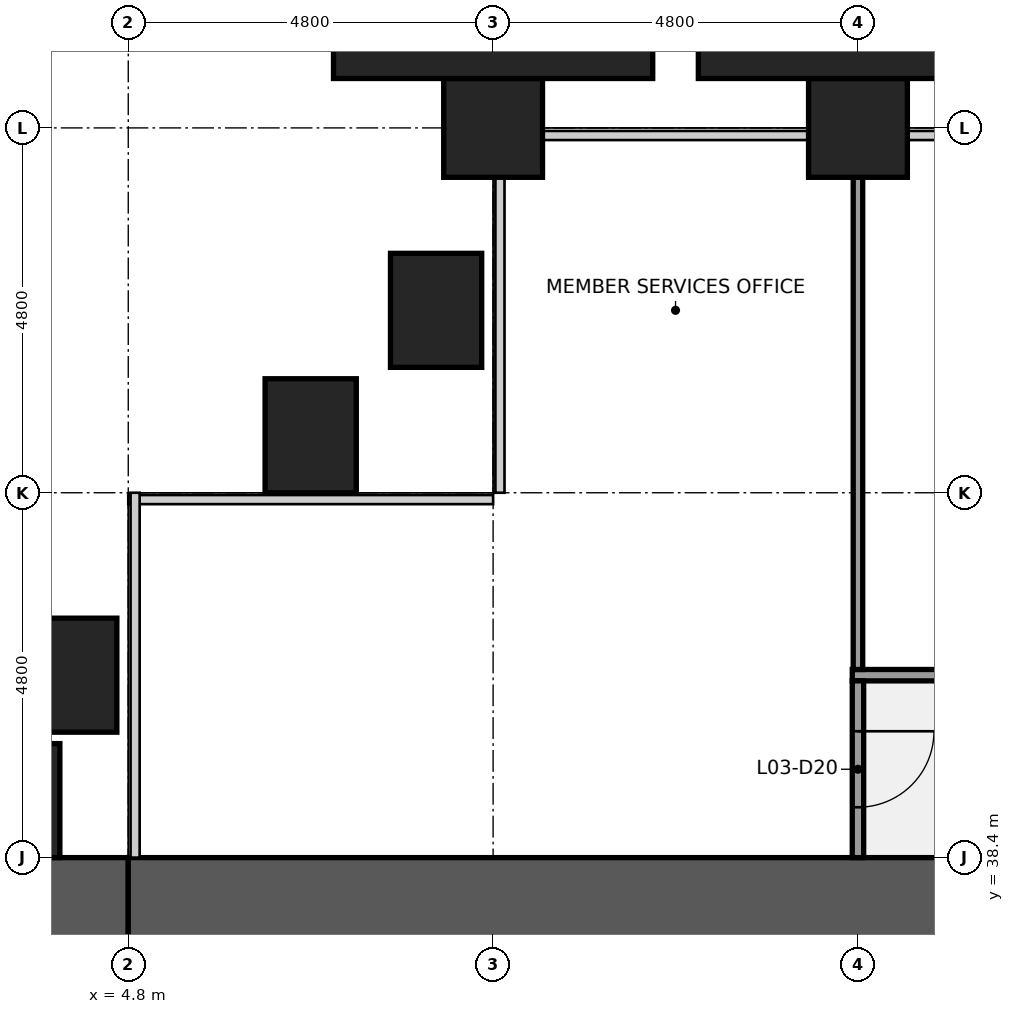
"""IFC4 building model, lengths in metres.
Left out: names, types, materials, properties, quantities, classifications, styles, units other than length and angle.
Written with IfcOpenShell. Run it as: python <this file> out.ifc"""

import sys

from ifc_helpers import new_model, si_unit, direction, frame, frame_2d, origin, origin_2d, place, context, subcontext, project, spatial, rectangle, extrude, element, fill, save


model = new_model("IFC4")
c1 = context("Model", 3, precision=1e-05, world=origin(), true_north=direction((0.0, 1.0)))
c2 = subcontext(c1, "Body", "Model", "MODEL_VIEW")
j1 = project(units=[si_unit("LENGTHUNIT", "METRE"), si_unit("PLANEANGLEUNIT", "RADIAN")], contexts=[c1])
p1 = place(None, origin())
s1 = spatial("IfcSite", under=j1, at=p1, CompositionType="ELEMENT")
p2 = place(p1, origin())
s2 = spatial("IfcBuilding", under=s1, at=p2, CompositionType="ELEMENT")
p3 = place(p2, frame((0.0, 0.0, 21.4)))
s3 = spatial("IfcBuildingStorey", under=s2, at=p3, CompositionType="ELEMENT", Elevation=21.4)
for number, where, z_axis, x_axis in (
    (1, (9.6, 48.0, 0.0), (0.0, 0.0, 1.0), (1.0, 0.0, 0.0)),
    (2, (14.4, 48.0, 0.0), (0.0, 0.0, 1.0), (1.0, 0.0, 0.0)),
):
    element("IfcColumn", number, at=place(p3, frame(where, z_axis=z_axis, x_axis=x_axis)), inside=s3, PredefinedType="COLUMN", context=c2, shape_type="SweptSolid", body=[
        extrude(rectangle(XDim=1.3, YDim=1.3, at=origin_2d()), origin(), (0.0, 0.0, 1.0), 4.4),
    ])
p4 = place(p3, frame((1.2, 37.8, 0.0), z_axis=(0.0, 0.0, 1.0), x_axis=(1.0, 0.0, 0.0)))
e3 = element("IfcWall", 3, at=p4, inside=s3, PredefinedType="SHEAR", context=c2, shape_type="SweptSolid", body=[
    extrude(rectangle(XDim=3.6, YDim=1.2, at=frame_2d((1.8, 0.0))), origin(), (0.0, 0.0, 1.0), 4.24),
])
p5 = place(p3, frame((4.8, 37.8, 0.0), z_axis=(0.0, 0.0, 1.0), x_axis=(1.0, 0.0, 0.0)))
e4 = element("IfcWall", 4, at=p5, inside=s3, PredefinedType="SHEAR", context=c2, shape_type="SweptSolid", body=[
    extrude(rectangle(XDim=13.2, YDim=1.2, at=frame_2d((6.6, 0.0))), origin(), (0.0, 0.0, 1.0), 4.24),
])
p6 = place(p5, frame((11.45, 0.0, 0.0)))
e5 = element("IfcOpeningElement", 5, at=p6, cuts=e4, PredefinedType="OPENING", context=c2, shape_type="SweptSolid", body=[
    extrude(rectangle(XDim=1.1, YDim=2.1, at=frame_2d((0.55, 1.05))), frame((0.0, 0.61, 0.0), z_axis=(0.0, -1.0, 0.0), x_axis=(1.0, 0.0, 0.0)), (0.0, 0.0, 1.0), 1.22),
])
p7 = place(p3, frame((14.325, 40.8, 0.0), z_axis=(0.0, 0.0, 1.0), x_axis=(1.0, 0.0, 0.0)))
e6 = element("IfcWall", 6, at=p7, inside=s3, PredefinedType="PARTITIONING", context=c2, shape_type="SweptSolid", body=[
    extrude(rectangle(XDim=4.95, YDim=0.15, at=frame_2d((2.475, 0.0))), origin(), (0.0, 0.0, 1.0), 3.27),
])
p8 = place(p7, frame((1.975, 0.0, 0.0)))
e7 = element("IfcOpeningElement", 7, at=p8, cuts=e6, PredefinedType="OPENING", context=c2, shape_type="SweptSolid", body=[
    extrude(rectangle(XDim=1.0, YDim=2.1, at=frame_2d((0.5, 1.05))), frame((0.0, 0.085, 0.0), z_axis=(0.0, -1.0, 0.0), x_axis=(1.0, 0.0, 0.0)), (0.0, 0.0, 1.0), 0.17),
])
p9 = place(p3, frame((14.4, 40.875, 0.0), z_axis=(0.0, 0.0, 1.0), x_axis=(0.0, 1.0, 0.0)))
e8 = element("IfcWall", 8, at=p9, inside=s3, PredefinedType="PARTITIONING", context=c2, shape_type="SweptSolid", body=[
    extrude(rectangle(XDim=6.475, YDim=0.125, at=frame_2d((3.238, 0.0))), origin(), (0.0, 0.0, 1.0), 3.27),
])
p10 = place(p3, frame((14.4, 38.4, 0.0), z_axis=(0.0, 0.0, 1.0), x_axis=(0.0, 1.0, 0.0)))
e9 = element("IfcWall", 9, at=p10, inside=s3, PredefinedType="PARTITIONING", context=c2, shape_type="SweptSolid", body=[
    extrude(rectangle(XDim=2.325, YDim=0.15, at=frame_2d((1.163, 0.0))), origin(), (0.0, 0.0, 1.0), 3.27),
])
p11 = place(p10, frame((0.663, 0.0, 0.0)))
e10 = element("IfcOpeningElement", 10, at=p11, cuts=e9, PredefinedType="OPENING", context=c2, shape_type="SweptSolid", body=[
    extrude(rectangle(XDim=1.0, YDim=2.1, at=frame_2d((0.5, 1.05))), frame((0.0, 0.085, 0.0), z_axis=(0.0, -1.0, 0.0), x_axis=(1.0, 0.0, 0.0)), (0.0, 0.0, 1.0), 0.17),
])
for number, where, z_axis, x_axis in (
    (11, (8.85, 45.6, 0.0), (0.0, 0.0, 1.0), (0.0, 1.0, 0.0)),
    (12, (7.2, 43.95, 0.0), (0.0, 0.0, 1.0), (1.0, 0.0, 0.0)),
    (13, (4.05, 40.8, 0.0), (0.0, 0.0, 1.0), (0.0, 1.0, 0.0)),
):
    element("IfcColumn", number, at=place(p3, frame(where, z_axis=z_axis, x_axis=x_axis)), inside=s3, PredefinedType="PILASTER", context=c2, shape_type="SweptSolid", body=[
        extrude(rectangle(XDim=1.2, YDim=1.5, at=origin_2d()), origin(), (0.0, 0.0, 1.0), 4.4),
    ])
p12 = place(p3, frame((2.4, 39.15, 0.0), z_axis=(0.0, 0.0, 1.0), x_axis=(1.0, 0.0, 0.0)))
e14 = element("IfcColumn", 14, at=p12, inside=s3, PredefinedType="PILASTER", context=c2, shape_type="SweptSolid", body=[
    extrude(rectangle(XDim=3.0, YDim=1.5, at=origin_2d()), origin(), (0.0, 0.0, 1.0), 4.4),
])
for number, where, z_axis, x_axis in (
    (15, (9.6, 49.075, 0.0), (0.0, 0.0, 1.0), (1.0, 0.0, 0.0)),
    (16, (14.4, 49.075, 0.0), (0.0, 0.0, 1.0), (1.0, 0.0, 0.0)),
):
    element("IfcColumn", number, at=place(p3, frame(where, z_axis=z_axis, x_axis=x_axis)), inside=s3, PredefinedType="PILASTER", context=c2, shape_type="SweptSolid", body=[
        extrude(rectangle(XDim=4.2, YDim=0.85, at=origin_2d()), origin(), (0.0, 0.0, 1.0), 4.4),
    ])
p13 = place(p11, origin())
e17 = element("IfcDoor", 17, at=p13, inside=s3, OperationType="SINGLE_SWING_RIGHT", PredefinedType="DOOR", context=c2, shape_type="SweptSolid", body=[
    extrude(rectangle(XDim=1.0, YDim=2.1, at=frame_2d((0.5, 1.05))), frame((0.0, 0.025, 0.0), z_axis=(0.0, -1.0, 0.0), x_axis=(1.0, 0.0, 0.0)), (0.0, 0.0, 1.0), 0.05),
])
fill(e10, e17)
save(model, sys.argv[1])
